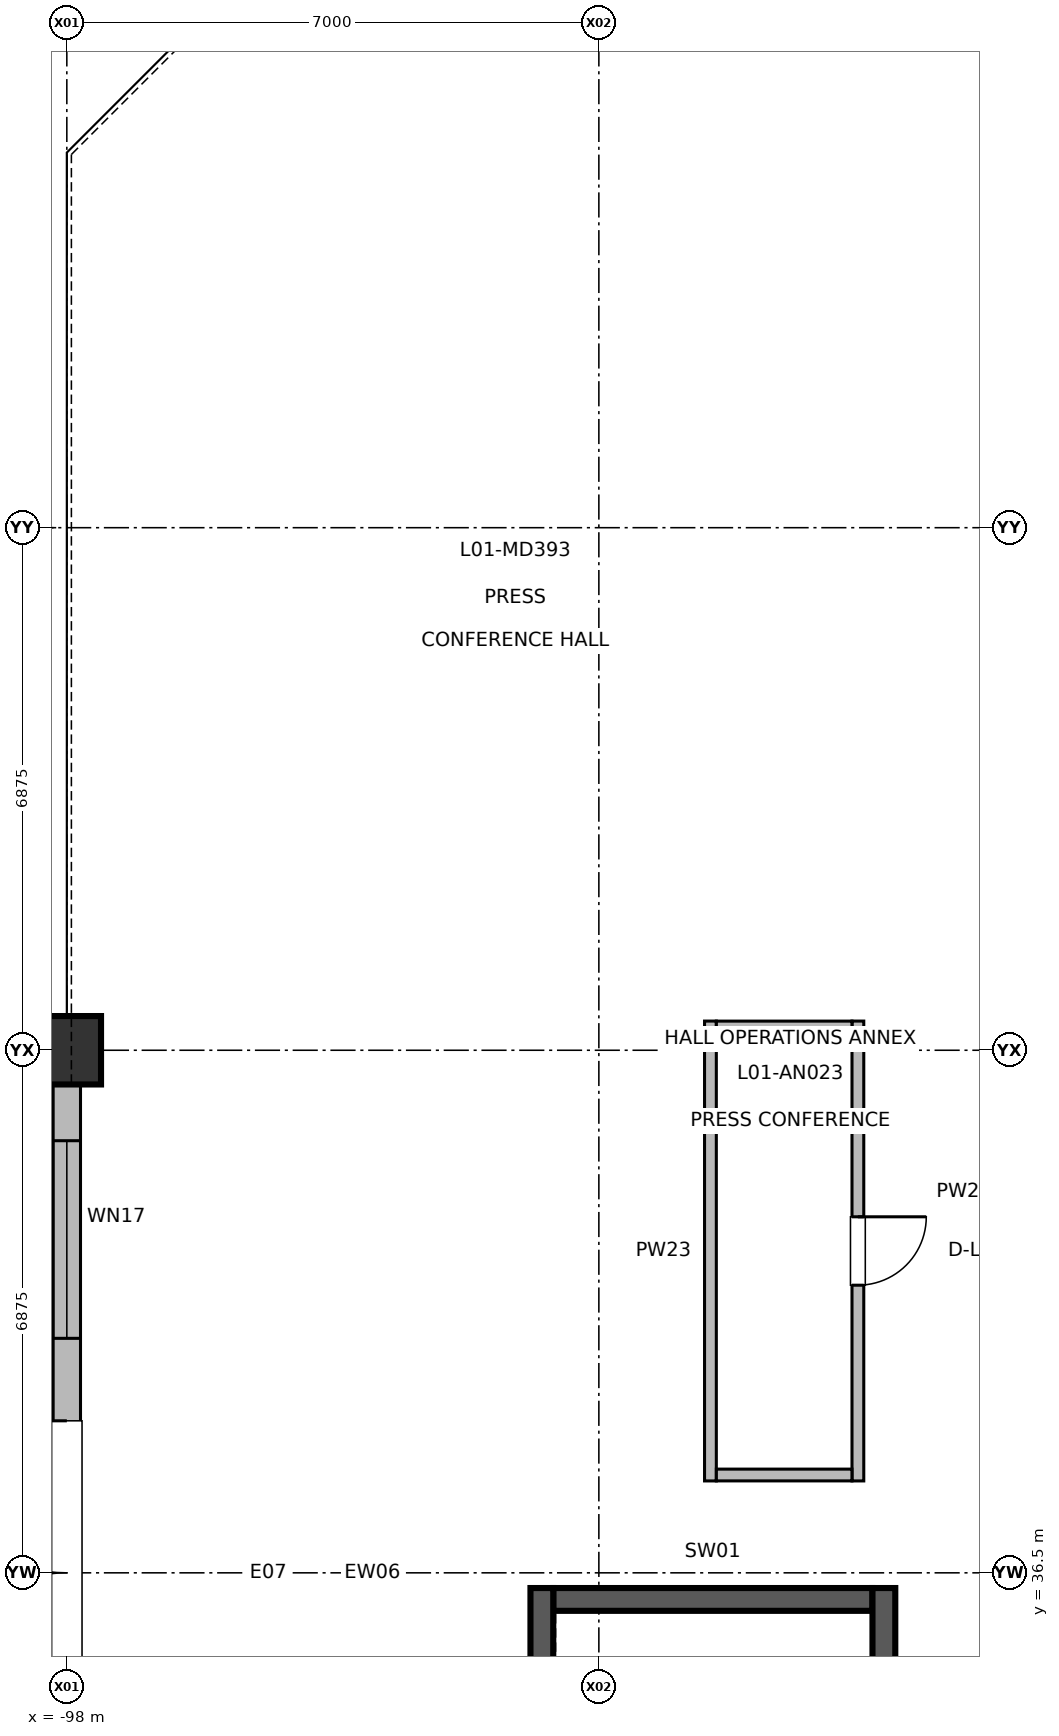
"""IFC4 building model, lengths in metres.
Left out: names, types, materials, properties, quantities, classifications, styles, units other than length and angle.
Written with IfcOpenShell. Run it as: python <this file> out.ifc"""

import sys

from ifc_helpers import new_model, si_unit, direction, frame, frame_2d, origin, origin_2d, place, context, subcontext, project, spatial, rectangle, extrude, element, fill, save


model = new_model("IFC4")
c1 = context("Model", 3, precision=1e-05, world=origin(), true_north=direction((0.0, 1.0)))
c2 = subcontext(c1, "Body", "Model", "MODEL_VIEW")
j1 = project(units=[si_unit("LENGTHUNIT", "METRE"), si_unit("PLANEANGLEUNIT", "RADIAN")], contexts=[c1])
p1 = place(None, origin())
s1 = spatial("IfcSite", under=j1, at=p1, CompositionType="ELEMENT")
p2 = place(p1, origin())
s2 = spatial("IfcBuilding", under=s1, at=p2, CompositionType="ELEMENT")
p3 = place(p2, origin())
s3 = spatial("IfcBuildingStorey", under=s2, at=p3, CompositionType="ELEMENT", Elevation=0.0)
p4 = place(p3, frame((-98.0, 43.375, 0.0), z_axis=(0.0, 0.0, 1.0), x_axis=(1.0, 0.0, 0.0)))
e1 = element("IfcColumn", 1, at=p4, inside=s3, PredefinedType="COLUMN", context=c2, shape_type="SweptSolid", body=[
    extrude(rectangle(XDim=0.9, YDim=0.9, at=origin_2d()), origin(), (0.0, 0.0, 1.0), 5.998),
])
p5 = place(p3, frame((-98.0, 30.065, 0.0), z_axis=(0.0, 0.0, 1.0), x_axis=(0.0, 1.0, 0.0)))
e2 = element("IfcWall", 2, at=p5, inside=s3, PredefinedType="SOLIDWALL", context=c2, shape_type="SweptSolid", body=[
    extrude(rectangle(XDim=12.87, YDim=0.36, at=frame_2d((6.435, 0.0))), origin(), (0.0, 0.0, 1.0), 4.655),
])
p6 = place(p5, frame((4.435, 0.0, 0.0)))
e3 = element("IfcOpeningElement", 3, at=p6, cuts=e2, PredefinedType="OPENING", context=c2, shape_type="SweptSolid", body=[
    extrude(rectangle(XDim=4.0, YDim=2.8, at=frame_2d((2.0, 1.4))), frame((0.0, 0.19, 0.0), z_axis=(0.0, -1.0, 0.0), x_axis=(1.0, 0.0, 0.0)), (0.0, 0.0, 1.0), 0.38),
])
p7 = place(p5, frame((0.75, 0.0, 1.0)))
e4 = element("IfcOpeningElement", 4, at=p7, cuts=e2, PredefinedType="OPENING", context=c2, shape_type="SweptSolid", body=[
    extrude(rectangle(XDim=2.6, YDim=2.0, at=frame_2d((1.3, 1.0))), frame((0.0, 0.19, 0.0), z_axis=(0.0, -1.0, 0.0), x_axis=(1.0, 0.0, 0.0)), (0.0, 0.0, 1.0), 0.38),
])
p8 = place(p5, frame((9.52, 0.0, 1.0)))
e5 = element("IfcOpeningElement", 5, at=p8, cuts=e2, PredefinedType="OPENING", context=c2, shape_type="SweptSolid", body=[
    extrude(rectangle(XDim=2.6, YDim=2.0, at=frame_2d((1.3, 1.0))), frame((0.0, 0.19, 0.0), z_axis=(0.0, -1.0, 0.0), x_axis=(1.0, 0.0, 0.0)), (0.0, 0.0, 1.0), 0.38),
])
p9 = place(p3, frame((-87.592, 43.759, 0.0), z_axis=(0.0, 0.0, 1.0), x_axis=(0.0, -1.0, 0.0)))
e6 = element("IfcWall", 6, at=p9, inside=s3, PredefinedType="PARTITIONING", context=c2, shape_type="SweptSolid", body=[
    extrude(rectangle(XDim=6.05, YDim=0.155, at=frame_2d((3.025, 0.0))), origin(), (0.0, 0.0, 1.0), 4.655),
])
p10 = place(p9, frame((2.575, 0.0, 0.0)))
e7 = element("IfcOpeningElement", 7, at=p10, cuts=e6, PredefinedType="OPENING", context=c2, shape_type="SweptSolid", body=[
    extrude(rectangle(XDim=0.9, YDim=2.15, at=frame_2d((0.45, 1.075))), frame((0.0, 0.087, 0.0), z_axis=(0.0, -1.0, 0.0), x_axis=(1.0, 0.0, 0.0)), (0.0, 0.0, 1.0), 0.175),
])
p11 = place(p3, frame((-89.532, 37.709, 0.0), z_axis=(0.0, 0.0, 1.0), x_axis=(0.0, 1.0, 0.0)))
e8 = element("IfcWall", 8, at=p11, inside=s3, PredefinedType="PARTITIONING", context=c2, shape_type="SweptSolid", body=[
    extrude(rectangle(XDim=6.05, YDim=0.155, at=frame_2d((3.025, 0.0))), origin(), (0.0, 0.0, 1.0), 4.655),
])
p12 = place(p3, frame((-89.454, 37.787, 0.0), z_axis=(0.0, 0.0, 1.0), x_axis=(1.0, 0.0, 0.0)))
e9 = element("IfcWall", 9, at=p12, inside=s3, PredefinedType="PARTITIONING", context=c2, shape_type="SweptSolid", body=[
    extrude(rectangle(XDim=1.784, YDim=0.155, at=frame_2d((0.892, 0.0))), origin(), (0.0, 0.0, 1.0), 5.02),
])
p13 = place(p3, frame((-89.454, 43.681, 0.0), z_axis=(0.0, 0.0, 1.0), x_axis=(1.0, 0.0, 0.0)))
e10 = element("IfcWall", 10, at=p13, inside=s3, PredefinedType="PARTITIONING", context=c2, shape_type="SweptSolid", body=[
    extrude(rectangle(XDim=1.784, YDim=0.155, at=frame_2d((0.892, 0.0))), origin(), (0.0, 0.0, 1.0), 4.655),
])
p14 = place(p3, frame((-91.6, 36.15, 0.0), z_axis=(0.0, 0.0, 1.0), x_axis=(1.0, 0.0, 0.0)))
e11 = element("IfcWall", 11, at=p14, inside=s3, PredefinedType="SHEAR", context=c2, shape_type="SweptSolid", body=[
    extrude(rectangle(XDim=4.2, YDim=0.3, at=frame_2d((2.1, 0.0))), origin(), (0.0, 0.0, 1.0), 5.78),
])
for number, where, z_axis, x_axis in (
    (12, (-91.75, 27.85, 0.0), (0.0, 0.0, 1.0), (0.0, 1.0, 0.0)),
    (13, (-87.25, 27.85, 0.0), (0.0, 0.0, 1.0), (0.0, 1.0, 0.0)),
):
    element("IfcWall", number, at=place(p3, frame(where, z_axis=z_axis, x_axis=x_axis)), inside=s3, PredefinedType="SHEAR", context=c2, shape_type="SweptSolid", body=[
        extrude(rectangle(XDim=8.45, YDim=0.3, at=frame_2d((4.225, 0.0))), origin(), (0.0, 0.0, 1.0), 5.78),
    ])
p15 = place(p6, origin())
e14 = element("IfcDoor", 14, at=p15, inside=s3, OperationType="DOUBLE_DOOR_SINGLE_SWING", PredefinedType="DOOR", context=c2, shape_type="SweptSolid", body=[
    extrude(rectangle(XDim=4.0, YDim=2.8, at=frame_2d((2.0, 1.4))), frame((0.0, 0.025, 0.0), z_axis=(0.0, -1.0, 0.0), x_axis=(1.0, 0.0, 0.0)), (0.0, 0.0, 1.0), 0.05),
])
fill(e3, e14)
p16 = place(p8, origin())
e15 = element("IfcWindow", 15, at=p16, inside=s3, PartitioningType="SINGLE_PANEL", PredefinedType="WINDOW", context=c2, shape_type="SweptSolid", body=[
    extrude(rectangle(XDim=2.6, YDim=2.0, at=frame_2d((1.3, 1.0))), frame((0.0, 0.03, 0.0), z_axis=(0.0, -1.0, 0.0), x_axis=(1.0, 0.0, 0.0)), (0.0, 0.0, 1.0), 0.06),
])
fill(e5, e15)
p17 = place(p10, origin())
e16 = element("IfcDoor", 16, at=p17, inside=s3, OperationType="SINGLE_SWING_LEFT", PredefinedType="DOOR", context=c2, shape_type="SweptSolid", body=[
    extrude(rectangle(XDim=0.9, YDim=2.15, at=frame_2d((0.45, 1.075))), frame((0.0, 0.025, 0.0), z_axis=(0.0, -1.0, 0.0), x_axis=(1.0, 0.0, 0.0)), (0.0, 0.0, 1.0), 0.05),
])
fill(e7, e16)
save(model, sys.argv[1])
